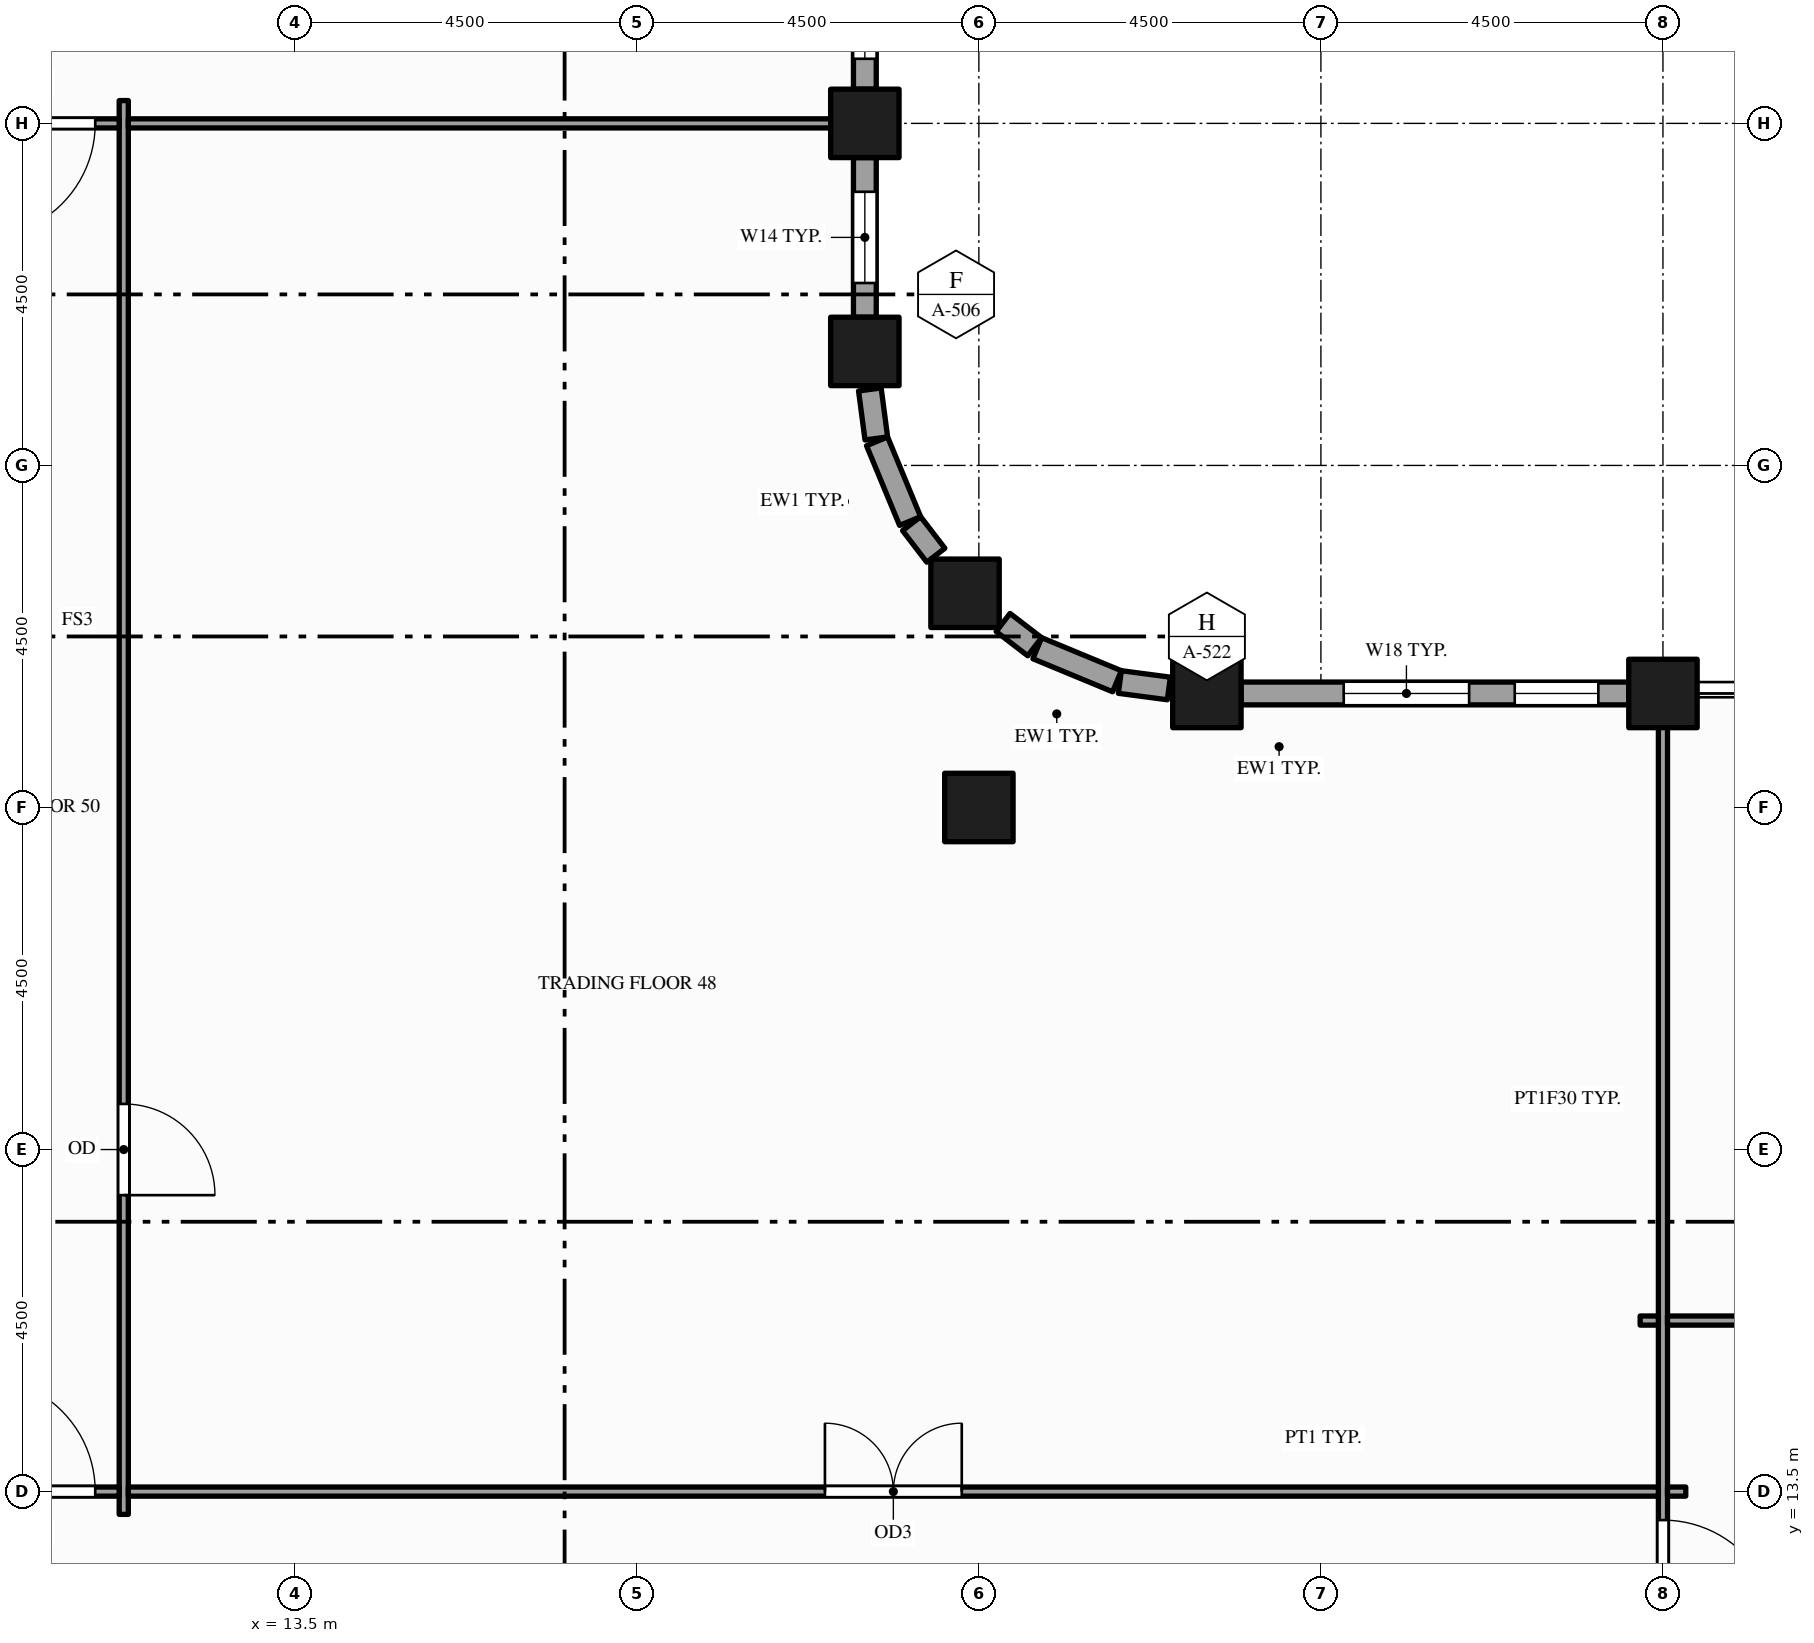
"""IFC4 building model, lengths in metres.
Left out: names, types, materials, properties, quantities, classifications, styles, units other than length and angle.
Written with IfcOpenShell. Run it as: python <this file> out.ifc"""

import sys

from ifc_helpers import new_model, si_unit, direction, frame, frame_2d, origin, origin_2d, place, context, subcontext, project, spatial, rectangle, hollow_rectangle, extrude, element, fill, save


model = new_model("IFC4")
c1 = context("Model", 3, precision=1e-05, world=origin(), true_north=direction((0.0, 1.0)))
c2 = subcontext(c1, "Body", "Model", "MODEL_VIEW")
j1 = project(units=[si_unit("LENGTHUNIT", "METRE"), si_unit("PLANEANGLEUNIT", "RADIAN")], contexts=[c1])
p1 = place(None, origin())
s1 = spatial("IfcSite", under=j1, at=p1, CompositionType="ELEMENT")
p2 = place(p1, origin())
s2 = spatial("IfcBuilding", under=s1, at=p2, CompositionType="ELEMENT")
p3 = place(p2, frame((0.0, 0.0, 155.0)))
s3 = spatial("IfcBuildingStorey", under=s2, at=p3, CompositionType="ELEMENT", Elevation=155.0)
for number, where, z_axis, x_axis in (
    (1, (21.0, 28.5, -0.15), (0.0, 0.0, 1.0), (1.0, 0.0, 0.0)),
    (2, (21.0, 31.5, -0.15), (0.0, 0.0, 1.0), (1.0, 0.0, 0.0)),
    (3, (22.318, 25.318, -0.15), (0.0, 0.0, 1.0), (1.0, 0.0, 0.0)),
    (4, (22.5, 22.5, -0.15), (0.0, 0.0, 1.0), (1.0, 0.0, 0.0)),
    (5, (25.5, 24.0, -0.15), (0.0, 0.0, 1.0), (1.0, 0.0, 0.0)),
    (6, (31.5, 24.0, -0.15), (0.0, 0.0, 1.0), (1.0, 0.0, 0.0)),
):
    element("IfcColumn", number, at=place(p3, frame(where, z_axis=z_axis, x_axis=x_axis)), inside=s3, PredefinedType="COLUMN", context=c2, shape_type="SweptSolid", body=[
        extrude(hollow_rectangle(XDim=0.9, YDim=0.9, WallThickness=0.045, at=origin_2d()), origin(), (0.0, 0.0, 1.0), 4.0),
    ])
p4 = place(p3, frame((31.05, 24.0, 0.0), z_axis=(0.0, 0.0, 1.0), x_axis=(-1.0, 0.0, 0.0)))
e7 = element("IfcWall", 7, at=p4, inside=s3, PredefinedType="STANDARD", context=c2, shape_type="SweptSolid", body=[
    extrude(rectangle(XDim=5.1, YDim=0.3, at=frame_2d((2.55, 0.0))), origin(), (0.0, 0.0, 1.0), 2.87),
])
p5 = place(p4, frame((0.4, 0.0, 0.9)))
e8 = element("IfcOpeningElement", 8, at=p5, cuts=e7, PredefinedType="OPENING", context=c2, shape_type="SweptSolid", body=[
    extrude(rectangle(XDim=1.1, YDim=1.75, at=frame_2d((0.55, 0.875))), frame((0.0, 0.16, 0.0), z_axis=(0.0, -1.0, 0.0), x_axis=(1.0, 0.0, 0.0)), (0.0, 0.0, 1.0), 0.32),
])
p6 = place(p4, frame((2.1, 0.0, 0.9)))
e9 = element("IfcOpeningElement", 9, at=p6, cuts=e7, PredefinedType="OPENING", context=c2, shape_type="SweptSolid", body=[
    extrude(rectangle(XDim=1.65, YDim=1.75, at=frame_2d((0.825, 0.875))), frame((0.0, 0.16, 0.0), z_axis=(0.0, -1.0, 0.0), x_axis=(1.0, 0.0, 0.0)), (0.0, 0.0, 1.0), 0.32),
])
p7 = place(p3, frame((25.0, 24.066, 0.0), z_axis=(0.0, 0.0, 1.0), x_axis=(-0.991423590996, 0.130687655177, 0.0)))
e10 = element("IfcWall", 10, at=p7, inside=s3, PredefinedType="STANDARD", context=c2, shape_type="SweptSolid", body=[
    extrude(rectangle(XDim=0.65, YDim=0.3, at=frame_2d((0.325, 0.0))), origin(), (0.0, 0.0, 1.0), 2.87),
])
p8 = place(p3, frame((24.317, 24.161, 0.0), z_axis=(0.0, 0.0, 1.0), x_axis=(-0.923914616768, 0.382598720491, 0.0)))
e11 = element("IfcWall", 11, at=p8, inside=s3, PredefinedType="STANDARD", context=c2, shape_type="SweptSolid", body=[
    extrude(rectangle(XDim=1.135, YDim=0.3, at=frame_2d((0.568, 0.0))), origin(), (0.0, 0.0, 1.0), 3.149),
])
for number, where, z_axis, x_axis in (
    (12, (23.234, 24.615, 0.0), (0.0, 0.0, 1.0), (-0.794, 0.609, 0.0)),
    (13, (21.934, 25.819, 0.0), (0.0, 0.0, 1.0), (-0.609, 0.794, 0.0)),
):
    element("IfcWall", number, at=place(p3, frame(where, z_axis=z_axis, x_axis=x_axis)), inside=s3, PredefinedType="STANDARD", context=c2, shape_type="SweptSolid", body=[
        extrude(rectangle(XDim=0.524, YDim=0.3, at=frame_2d((0.262, 0.0))), origin(), (0.0, 0.0, 1.0), 3.149),
    ])
p9 = place(p3, frame((21.595, 26.268, 0.0), z_axis=(0.0, 0.0, 1.0), x_axis=(-0.382598720491, 0.923914616768, 0.0)))
e14 = element("IfcWall", 14, at=p9, inside=s3, PredefinedType="STANDARD", context=c2, shape_type="SweptSolid", body=[
    extrude(rectangle(XDim=1.135, YDim=0.3, at=frame_2d((0.568, 0.0))), origin(), (0.0, 0.0, 1.0), 3.149),
])
p10 = place(p3, frame((21.151, 27.355, 0.0), z_axis=(0.0, 0.0, 1.0), x_axis=(-0.130687655177, 0.991423590996, 0.0)))
e15 = element("IfcWall", 15, at=p10, inside=s3, PredefinedType="STANDARD", context=c2, shape_type="SweptSolid", body=[
    extrude(rectangle(XDim=0.65, YDim=0.3, at=frame_2d((0.325, 0.0))), origin(), (0.0, 0.0, 1.0), 3.149),
])
p11 = place(p3, frame((21.0, 28.95, 0.0), z_axis=(0.0, 0.0, 1.0), x_axis=(0.0, 1.0, 0.0)))
e16 = element("IfcWall", 16, at=p11, inside=s3, PredefinedType="STANDARD", context=c2, shape_type="SweptSolid", body=[
    extrude(rectangle(XDim=2.1, YDim=0.3, at=frame_2d((1.05, 0.0))), origin(), (0.0, 0.0, 1.0), 3.149),
])
p12 = place(p11, frame((0.45, 0.0, 0.9)))
e17 = element("IfcOpeningElement", 17, at=p12, cuts=e16, PredefinedType="OPENING", context=c2, shape_type="SweptSolid", body=[
    extrude(rectangle(XDim=1.2, YDim=2.0, at=frame_2d((0.6, 1.0))), frame((0.0, 0.16, 0.0), z_axis=(0.0, -1.0, 0.0), x_axis=(1.0, 0.0, 0.0)), (0.0, 0.0, 1.0), 0.32),
])
p13 = place(p3, frame((21.0, 31.95, 0.0), z_axis=(0.0, 0.0, 1.0), x_axis=(0.0, 1.0, 0.0)))
e18 = element("IfcWall", 18, at=p13, inside=s3, PredefinedType="STANDARD", context=c2, shape_type="SweptSolid", body=[
    extrude(rectangle(XDim=4.05, YDim=0.3, at=frame_2d((2.025, 0.0))), origin(), (0.0, 0.0, 1.0), 3.149),
])
p14 = place(p13, frame((0.4, 0.0, 0.9)))
e19 = element("IfcOpeningElement", 19, at=p14, cuts=e18, PredefinedType="OPENING", context=c2, shape_type="SweptSolid", body=[
    extrude(rectangle(XDim=1.1, YDim=2.0, at=frame_2d((0.55, 1.0))), frame((0.0, 0.16, 0.0), z_axis=(0.0, -1.0, 0.0), x_axis=(1.0, 0.0, 0.0)), (0.0, 0.0, 1.0), 0.32),
])
p15 = place(p13, frame((2.1, 0.0, 0.9)))
e20 = element("IfcOpeningElement", 20, at=p15, cuts=e18, PredefinedType="OPENING", context=c2, shape_type="SweptSolid", body=[
    extrude(rectangle(XDim=1.55, YDim=2.0, at=frame_2d((0.775, 1.0))), frame((0.0, 0.16, 0.0), z_axis=(0.0, -1.0, 0.0), x_axis=(1.0, 0.0, 0.0)), (0.0, 0.0, 1.0), 0.32),
])
p16 = place(p3, frame((11.25, 13.2, 0.0), z_axis=(0.0, 0.0, 1.0), x_axis=(0.0, 1.0, 0.0)))
e21 = element("IfcWall", 21, at=p16, inside=s3, PredefinedType="PARTITIONING", context=c2, shape_type="SweptSolid", body=[
    extrude(rectangle(XDim=18.6, YDim=0.12, at=frame_2d((9.3, 0.0))), origin(), (0.0, 0.0, 1.0), 2.6),
])
p17 = place(p16, frame((4.2, 0.0, 0.0)))
e22 = element("IfcOpeningElement", 22, at=p17, cuts=e21, PredefinedType="OPENING", context=c2, shape_type="SweptSolid", body=[
    extrude(rectangle(XDim=1.2, YDim=2.1, at=frame_2d((0.6, 1.05))), frame((0.0, 0.07, 0.0), z_axis=(0.0, -1.0, 0.0), x_axis=(1.0, 0.0, 0.0)), (0.0, 0.0, 1.0), 0.14),
])
p18 = place(p3, frame((31.5, 1.65, 0.0), z_axis=(0.0, 0.0, 1.0), x_axis=(0.0, 1.0, 0.0)))
e23 = element("IfcWall", 23, at=p18, inside=s3, PredefinedType="PARTITIONING", context=c2, shape_type="SweptSolid", body=[
    extrude(rectangle(XDim=22.2, YDim=0.12, at=frame_2d((11.1, 0.0))), origin(), (0.0, 0.0, 1.0), 2.87),
])
p19 = place(p18, frame((9.975, 0.0, 0.0)))
e24 = element("IfcOpeningElement", 24, at=p19, cuts=e23, PredefinedType="OPENING", context=c2, shape_type="SweptSolid", body=[
    extrude(rectangle(XDim=1.5, YDim=2.1, at=frame_2d((0.75, 1.05))), frame((0.0, 0.07, 0.0), z_axis=(0.0, -1.0, 0.0), x_axis=(1.0, 0.0, 0.0)), (0.0, 0.0, 1.0), 0.14),
])
p20 = place(p3, frame((9.06, 13.5, 0.0), z_axis=(0.0, 0.0, 1.0), x_axis=(1.0, 0.0, 0.0)))
e25 = element("IfcWall", 25, at=p20, inside=s3, PredefinedType="PARTITIONING", context=c2, shape_type="SweptSolid", body=[
    extrude(rectangle(XDim=2.13, YDim=0.12, at=frame_2d((1.065, 0.0))), origin(), (0.0, 0.0, 1.0), 2.87),
])
p21 = place(p20, frame((0.315, 0.0, 0.0)))
e26 = element("IfcOpeningElement", 26, at=p21, cuts=e25, PredefinedType="OPENING", context=c2, shape_type="SweptSolid", body=[
    extrude(rectangle(XDim=1.5, YDim=2.1, at=frame_2d((0.75, 1.05))), frame((0.0, 0.07, 0.0), z_axis=(0.0, -1.0, 0.0), x_axis=(1.0, 0.0, 0.0)), (0.0, 0.0, 1.0), 0.14),
])
p22 = place(p3, frame((11.31, 13.5, 0.0), z_axis=(0.0, 0.0, 1.0), x_axis=(1.0, 0.0, 0.0)))
e27 = element("IfcWall", 27, at=p22, inside=s3, PredefinedType="PARTITIONING", context=c2, shape_type="SweptSolid", body=[
    extrude(rectangle(XDim=20.13, YDim=0.12, at=frame_2d((10.065, 0.0))), origin(), (0.0, 0.0, 1.0), 2.87),
])
p23 = place(p22, frame((9.165, 0.0, 0.0)))
e28 = element("IfcOpeningElement", 28, at=p23, cuts=e27, PredefinedType="OPENING", context=c2, shape_type="SweptSolid", body=[
    extrude(rectangle(XDim=1.8, YDim=2.1, at=frame_2d((0.9, 1.05))), frame((0.0, 0.07, 0.0), z_axis=(0.0, -1.0, 0.0), x_axis=(1.0, 0.0, 0.0)), (0.0, 0.0, 1.0), 0.14),
])
for number, where, z_axis, x_axis in (
    (29, (31.56, 13.5, 0.0), (0.0, 0.0, 1.0), (1.0, 0.0, 0.0)),
    (30, (31.2, 15.75, 0.0), (0.0, 0.0, 1.0), (1.0, 0.0, 0.0)),
):
    element("IfcWall", number, at=place(p3, frame(where, z_axis=z_axis, x_axis=x_axis)), inside=s3, PredefinedType="PARTITIONING", context=c2, shape_type="SweptSolid", body=[
        extrude(rectangle(XDim=0.24, YDim=0.12, at=frame_2d((0.12, 0.0))), origin(), (0.0, 0.0, 1.0), 2.87),
    ])
p24 = place(p3, frame((31.56, 15.75, 0.0), z_axis=(0.0, 0.0, 1.0), x_axis=(1.0, 0.0, 0.0)))
e31 = element("IfcWall", 31, at=p24, inside=s3, PredefinedType="PARTITIONING", context=c2, shape_type="SweptSolid", body=[
    extrude(rectangle(XDim=6.63, YDim=0.12, at=frame_2d((3.315, 0.0))), origin(), (0.0, 0.0, 1.0), 2.87),
])
p25 = place(p24, frame((2.715, 0.0, 0.0)))
e32 = element("IfcOpeningElement", 32, at=p25, cuts=e31, PredefinedType="OPENING", context=c2, shape_type="SweptSolid", body=[
    extrude(rectangle(XDim=1.2, YDim=2.1, at=frame_2d((0.6, 1.05))), frame((0.0, 0.07, 0.0), z_axis=(0.0, -1.0, 0.0), x_axis=(1.0, 0.0, 0.0)), (0.0, 0.0, 1.0), 0.14),
])
p26 = place(p3, frame((9.06, 31.5, 0.0), z_axis=(0.0, 0.0, 1.0), x_axis=(1.0, 0.0, 0.0)))
e33 = element("IfcWall", 33, at=p26, inside=s3, PredefinedType="PARTITIONING", context=c2, shape_type="SweptSolid", body=[
    extrude(rectangle(XDim=2.13, YDim=0.12, at=frame_2d((1.065, 0.0))), origin(), (0.0, 0.0, 1.0), 2.87),
])
p27 = place(p26, frame((0.315, 0.0, 0.0)))
e34 = element("IfcOpeningElement", 34, at=p27, cuts=e33, PredefinedType="OPENING", context=c2, shape_type="SweptSolid", body=[
    extrude(rectangle(XDim=1.5, YDim=2.1, at=frame_2d((0.75, 1.05))), frame((0.0, 0.07, 0.0), z_axis=(0.0, -1.0, 0.0), x_axis=(1.0, 0.0, 0.0)), (0.0, 0.0, 1.0), 0.14),
])
p28 = place(p3, frame((11.31, 31.5, 0.0), z_axis=(0.0, 0.0, 1.0), x_axis=(1.0, 0.0, 0.0)))
e35 = element("IfcWall", 35, at=p28, inside=s3, PredefinedType="PARTITIONING", context=c2, shape_type="SweptSolid", body=[
    extrude(rectangle(XDim=9.54, YDim=0.12, at=frame_2d((4.77, 0.0))), origin(), (0.0, 0.0, 1.0), 2.87),
])
p29 = place(p5, origin())
e36 = element("IfcWindow", 36, at=p29, inside=s3, PartitioningType="SINGLE_PANEL", PredefinedType="WINDOW", context=c2, shape_type="SweptSolid", body=[
    extrude(rectangle(XDim=1.1, YDim=1.75, at=frame_2d((0.55, 0.875))), frame((0.0, 0.03, 0.0), z_axis=(0.0, -1.0, 0.0), x_axis=(1.0, 0.0, 0.0)), (0.0, 0.0, 1.0), 0.06),
])
fill(e8, e36)
p30 = place(p6, origin())
e37 = element("IfcWindow", 37, at=p30, inside=s3, PartitioningType="SINGLE_PANEL", PredefinedType="WINDOW", context=c2, shape_type="SweptSolid", body=[
    extrude(rectangle(XDim=1.65, YDim=1.75, at=frame_2d((0.825, 0.875))), frame((0.0, 0.03, 0.0), z_axis=(0.0, -1.0, 0.0), x_axis=(1.0, 0.0, 0.0)), (0.0, 0.0, 1.0), 0.06),
])
fill(e9, e37)
p31 = place(p12, origin())
e38 = element("IfcWindow", 38, at=p31, inside=s3, PartitioningType="SINGLE_PANEL", PredefinedType="WINDOW", context=c2, shape_type="SweptSolid", body=[
    extrude(rectangle(XDim=1.2, YDim=2.0, at=frame_2d((0.6, 1.0))), frame((0.0, 0.03, 0.0), z_axis=(0.0, -1.0, 0.0), x_axis=(1.0, 0.0, 0.0)), (0.0, 0.0, 1.0), 0.06),
])
fill(e17, e38)
p32 = place(p14, origin())
e39 = element("IfcWindow", 39, at=p32, inside=s3, PartitioningType="SINGLE_PANEL", PredefinedType="WINDOW", context=c2, shape_type="SweptSolid", body=[
    extrude(rectangle(XDim=1.1, YDim=2.0, at=frame_2d((0.55, 1.0))), frame((0.0, 0.03, 0.0), z_axis=(0.0, -1.0, 0.0), x_axis=(1.0, 0.0, 0.0)), (0.0, 0.0, 1.0), 0.06),
])
fill(e19, e39)
p33 = place(p19, origin())
e40 = element("IfcDoor", 40, at=p33, inside=s3, OperationType="SINGLE_SWING_LEFT", PredefinedType="DOOR", context=c2, shape_type="SweptSolid", body=[
    extrude(rectangle(XDim=1.5, YDim=2.1, at=frame_2d((0.75, 1.05))), frame((0.0, 0.025, 0.0), z_axis=(0.0, -1.0, 0.0), x_axis=(1.0, 0.0, 0.0)), (0.0, 0.0, 1.0), 0.05),
])
fill(e24, e40)
p34 = place(p23, origin())
e41 = element("IfcDoor", 41, at=p34, inside=s3, OperationType="DOUBLE_DOOR_SINGLE_SWING", PredefinedType="DOOR", context=c2, shape_type="SweptSolid", body=[
    extrude(rectangle(XDim=1.8, YDim=2.1, at=frame_2d((0.9, 1.05))), frame((0.0, 0.025, 0.0), z_axis=(0.0, -1.0, 0.0), x_axis=(1.0, 0.0, 0.0)), (0.0, 0.0, 1.0), 0.05),
])
fill(e28, e41)
p35 = place(p21, origin())
e42 = element("IfcDoor", 42, at=p35, inside=s3, OperationType="SINGLE_SWING_LEFT", PredefinedType="DOOR", context=c2, shape_type="SweptSolid", body=[
    extrude(rectangle(XDim=1.5, YDim=2.1, at=frame_2d((0.75, 1.05))), frame((0.0, 0.025, 0.0), z_axis=(0.0, -1.0, 0.0), x_axis=(1.0, 0.0, 0.0)), (0.0, 0.0, 1.0), 0.05),
])
fill(e26, e42)
p36 = place(p27, origin())
e43 = element("IfcDoor", 43, at=p36, inside=s3, OperationType="SINGLE_SWING_LEFT", PredefinedType="DOOR", context=c2, shape_type="SweptSolid", body=[
    extrude(rectangle(XDim=1.5, YDim=2.1, at=frame_2d((0.75, 1.05))), frame((0.0, 0.025, 0.0), z_axis=(0.0, -1.0, 0.0), x_axis=(1.0, 0.0, 0.0)), (0.0, 0.0, 1.0), 0.05),
])
fill(e34, e43)
p37 = place(p17, origin())
e44 = element("IfcDoor", 44, at=p37, inside=s3, OperationType="SINGLE_SWING_LEFT", PredefinedType="DOOR", context=c2, shape_type="SweptSolid", body=[
    extrude(rectangle(XDim=1.2, YDim=2.1, at=frame_2d((0.6, 1.05))), frame((0.0, 0.025, 0.0), z_axis=(0.0, -1.0, 0.0), x_axis=(1.0, 0.0, 0.0)), (0.0, 0.0, 1.0), 0.05),
])
fill(e22, e44)
save(model, sys.argv[1])
